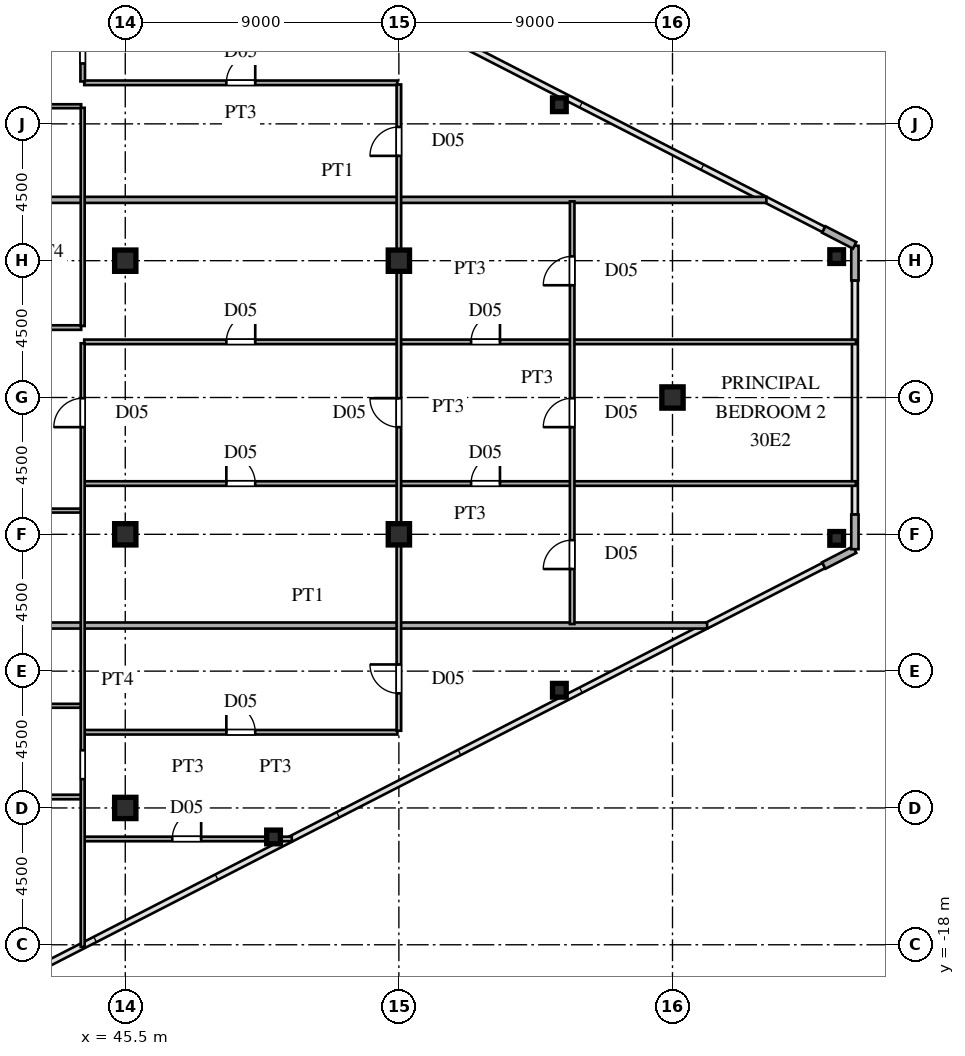
"""IFC4 building model, lengths in metres.
Left out: names, types, materials, properties, quantities, classifications, styles, units other than length and angle.
Written with IfcOpenShell. Run it as: python <this file> out.ifc"""

import sys

from ifc_helpers import new_model, si_unit, direction, frame, frame_2d, origin, origin_2d, place, context, subcontext, project, spatial, rectangle, hollow_rectangle, i_section, extrude, source, transform, mapped, element, fill, save


model = new_model("IFC4")
c1 = context("Model", 3, precision=1e-05, world=origin(), true_north=direction((0.0, 1.0)))
c2 = subcontext(c1, "Body", "Model", "MODEL_VIEW")
j1 = project(units=[si_unit("LENGTHUNIT", "METRE"), si_unit("PLANEANGLEUNIT", "RADIAN")], contexts=[c1])
p1 = place(None, origin())
s1 = spatial("IfcSite", under=j1, at=p1, CompositionType="ELEMENT")
p2 = place(p1, origin())
s2 = spatial("IfcBuilding", under=s1, at=p2, CompositionType="ELEMENT")
p3 = place(p2, frame((0.0, 0.0, 114.0)))
s3 = spatial("IfcBuildingStorey", under=s2, at=p3, CompositionType="ELEMENT", Elevation=114.0)
m1 = source(origin(), c2, "Body", "SweptSolid", [
    extrude(i_section(OverallWidth=0.7, OverallDepth=0.7, WebThickness=0.028, FlangeThickness=0.045, at=origin_2d()), origin(), (0.0, 0.0, 1.0), 3.6),
])
for number, where, z_axis, x_axis in (
    (1, (45.5, -13.5, 0.0), (0.0, 0.0, 1.0), (1.0, 0.0, 0.0)),
    (2, (45.5, -4.5, 0.0), (0.0, 0.0, 1.0), (1.0, 0.0, 0.0)),
    (3, (45.5, 4.5, 0.0), (0.0, 0.0, 1.0), (1.0, 0.0, 0.0)),
    (4, (54.5, -4.5, 0.0), (0.0, 0.0, 1.0), (1.0, 0.0, 0.0)),
    (5, (54.5, 4.5, 0.0), (0.0, 0.0, 1.0), (1.0, 0.0, 0.0)),
    (6, (63.5, 0.0, 0.0), (0.0, 0.0, 1.0), (1.0, 0.0, 0.0)),
):
    element("IfcColumn", number, at=place(p3, frame(where, z_axis=z_axis, x_axis=x_axis)), inside=s3, PredefinedType="COLUMN", context=c2, shape_type="MappedRepresentation", body=[
        mapped(m1, transform((0.0, 0.0, 0.0), scale=1.0)),
    ])
m2 = source(origin(), c2, "Body", "SweptSolid", [
    extrude(hollow_rectangle(XDim=0.45, YDim=0.45, WallThickness=0.018, at=origin_2d()), origin(), (0.0, 0.0, 1.0), 3.6),
])
for number, where, z_axis, x_axis in (
    (7, (68.9, -4.634, 0.0), (0.0, 0.0, 1.0), (1.0, 0.0, 0.0)),
    (8, (68.9, 4.634, 0.0), (0.0, 0.0, 1.0), (1.0, 0.0, 0.0)),
    (9, (50.377, -14.453, 0.0), (0.0, 0.0, 1.0), (1.0, 0.0, 0.0)),
    (10, (59.779, -9.629, 0.0), (0.0, 0.0, 1.0), (1.0, 0.0, 0.0)),
    (11, (59.779, 9.629, 0.0), (0.0, 0.0, 1.0), (1.0, 0.0, 0.0)),
):
    element("IfcColumn", number, at=place(p3, frame(where, z_axis=z_axis, x_axis=x_axis)), inside=s3, PredefinedType="COLUMN", context=c2, shape_type="MappedRepresentation", body=[
        mapped(m2, transform((0.0, 0.0, 0.0), scale=1.0)),
    ])
p4 = place(p3, frame((68.477, -5.525, 0.0), z_axis=(0.0, 0.0, 1.0), x_axis=(0.889797395748, 0.456355776255, 0.0)))
e12 = element("IfcWall", 12, at=p4, inside=s3, PredefinedType="SOLIDWALL", context=c2, shape_type="SweptSolid", body=[
    extrude(rectangle(XDim=1.14, YDim=0.24, at=frame_2d((0.57, 0.0))), origin(), (0.0, 0.0, 1.0), 3.38),
])
for number, where, z_axis, x_axis in (
    (13, (69.5, -4.99, 0.0), (0.0, 0.0, 1.0), (0.0, 1.0, 0.0)),
    (14, (69.5, 3.85, 0.0), (0.0, 0.0, 1.0), (0.0, 1.0, 0.0)),
):
    element("IfcWall", number, at=place(p3, frame(where, z_axis=z_axis, x_axis=x_axis)), inside=s3, PredefinedType="SOLIDWALL", context=c2, shape_type="SweptSolid", body=[
        extrude(rectangle(XDim=1.14, YDim=0.24, at=frame_2d((0.57, 0.0))), origin(), (0.0, 0.0, 1.0), 3.38),
    ])
p5 = place(p3, frame((69.491, 5.005, 0.0), z_axis=(0.0, 0.0, 1.0), x_axis=(-0.889797395748, 0.456355776255, 0.0)))
e15 = element("IfcWall", 15, at=p5, inside=s3, PredefinedType="SOLIDWALL", context=c2, shape_type="SweptSolid", body=[
    extrude(rectangle(XDim=1.14, YDim=0.24, at=frame_2d((0.57, 0.0))), origin(), (0.0, 0.0, 1.0), 3.38),
])
p6 = place(p3, frame((44.15, -14.52, 0.0), z_axis=(0.0, 0.0, 1.0), x_axis=(1.0, 0.0, 0.0)))
e16 = element("IfcWall", 16, at=p6, inside=s3, PredefinedType="PARTITIONING", context=c2, shape_type="SweptSolid", body=[
    extrude(rectangle(XDim=6.828, YDim=0.15, at=frame_2d((3.414, 0.0))), origin(), (0.0, 0.0, 1.0), 2.78),
])
p7 = place(p6, frame((2.896, 0.0, 0.0)))
e17 = element("IfcOpeningElement", 17, at=p7, cuts=e16, PredefinedType="OPENING", context=c2, shape_type="SweptSolid", body=[
    extrude(rectangle(XDim=0.95, YDim=2.15, at=frame_2d((0.475, 1.075))), frame((0.0, 0.085, 0.0), z_axis=(0.0, -1.0, 0.0), x_axis=(1.0, 0.0, 0.0)), (0.0, 0.0, 1.0), 0.17),
])
p8 = place(p3, frame((38.35, -13.14, 0.0), z_axis=(0.0, 0.0, 1.0), x_axis=(1.0, 0.0, 0.0)))
e18 = element("IfcWall", 18, at=p8, inside=s3, PredefinedType="PARTITIONING", context=c2, shape_type="SweptSolid", body=[
    extrude(rectangle(XDim=5.7, YDim=0.15, at=frame_2d((2.85, 0.0))), origin(), (0.0, 0.0, 1.0), 3.38),
])
p9 = place(p8, frame((2.375, 0.0, 0.0)))
e19 = element("IfcOpeningElement", 19, at=p9, cuts=e18, PredefinedType="OPENING", context=c2, shape_type="SweptSolid", body=[
    extrude(rectangle(XDim=0.95, YDim=2.15, at=frame_2d((0.475, 1.075))), frame((0.0, 0.085, 0.0), z_axis=(0.0, -1.0, 0.0), x_axis=(1.0, 0.0, 0.0)), (0.0, 0.0, 1.0), 0.17),
])
p10 = place(p3, frame((44.15, -11.01, 0.0), z_axis=(0.0, 0.0, 1.0), x_axis=(1.0, 0.0, 0.0)))
e20 = element("IfcWall", 20, at=p10, inside=s3, PredefinedType="PARTITIONING", context=c2, shape_type="SweptSolid", body=[
    extrude(rectangle(XDim=10.3, YDim=0.15, at=frame_2d((5.15, 0.0))), origin(), (0.0, 0.0, 1.0), 3.38),
])
p11 = place(p10, frame((4.675, 0.0, 0.0)))
e21 = element("IfcOpeningElement", 21, at=p11, cuts=e20, PredefinedType="OPENING", context=c2, shape_type="SweptSolid", body=[
    extrude(rectangle(XDim=0.95, YDim=2.15, at=frame_2d((0.475, 1.075))), frame((0.0, 0.085, 0.0), z_axis=(0.0, -1.0, 0.0), x_axis=(1.0, 0.0, 0.0)), (0.0, 0.0, 1.0), 0.17),
])
p12 = place(p3, frame((38.35, -10.14, 0.0), z_axis=(0.0, 0.0, 1.0), x_axis=(1.0, 0.0, 0.0)))
e22 = element("IfcWall", 22, at=p12, inside=s3, PredefinedType="PARTITIONING", context=c2, shape_type="SweptSolid", body=[
    extrude(rectangle(XDim=5.7, YDim=0.13, at=frame_2d((2.85, 0.0))), origin(), (0.0, 0.0, 1.0), 3.38),
])
p13 = place(p12, frame((2.41, 0.0, 0.0)))
e23 = element("IfcOpeningElement", 23, at=p13, cuts=e22, PredefinedType="OPENING", context=c2, shape_type="SweptSolid", body=[
    extrude(rectangle(XDim=0.88, YDim=2.1, at=frame_2d((0.44, 1.05))), frame((0.0, 0.075, 0.0), z_axis=(0.0, -1.0, 0.0), x_axis=(1.0, 0.0, 0.0)), (0.0, 0.0, 1.0), 0.15),
])
p14 = place(p3, frame((38.38, -7.5, 0.0), z_axis=(0.0, 0.0, 1.0), x_axis=(1.0, 0.0, 0.0)))
e24 = element("IfcWall", 24, at=p14, inside=s3, PredefinedType="PARTITIONING", context=c2, shape_type="SweptSolid", body=[
    extrude(rectangle(XDim=26.259, YDim=0.2, at=frame_2d((13.129, 0.0))), origin(), (0.0, 0.0, 1.0), 3.38),
])
p15 = place(p3, frame((38.35, -3.72, 0.0), z_axis=(0.0, 0.0, 1.0), x_axis=(1.0, 0.0, 0.0)))
e25 = element("IfcWall", 25, at=p15, inside=s3, PredefinedType="PARTITIONING", context=c2, shape_type="SweptSolid", body=[
    extrude(rectangle(XDim=5.7, YDim=0.13, at=frame_2d((2.85, 0.0))), origin(), (0.0, 0.0, 1.0), 3.38),
])
p16 = place(p15, frame((2.41, 0.0, 0.0)))
e26 = element("IfcOpeningElement", 26, at=p16, cuts=e25, PredefinedType="OPENING", context=c2, shape_type="SweptSolid", body=[
    extrude(rectangle(XDim=0.88, YDim=2.1, at=frame_2d((0.44, 1.05))), frame((0.0, 0.075, 0.0), z_axis=(0.0, -1.0, 0.0), x_axis=(1.0, 0.0, 0.0)), (0.0, 0.0, 1.0), 0.15),
])
p17 = place(p3, frame((44.15, -2.83, 0.0), z_axis=(0.0, 0.0, 1.0), x_axis=(1.0, 0.0, 0.0)))
e27 = element("IfcWall", 27, at=p17, inside=s3, PredefinedType="PARTITIONING", context=c2, shape_type="SweptSolid", body=[
    extrude(rectangle(XDim=25.385, YDim=0.15, at=frame_2d((12.692, 0.0))), origin(), (0.0, 0.0, 1.0), 3.38),
])
p18 = place(p17, frame((4.675, 0.0, 0.0)))
e28 = element("IfcOpeningElement", 28, at=p18, cuts=e27, PredefinedType="OPENING", context=c2, shape_type="SweptSolid", body=[
    extrude(rectangle(XDim=0.95, YDim=2.15, at=frame_2d((0.475, 1.075))), frame((0.0, 0.085, 0.0), z_axis=(0.0, -1.0, 0.0), x_axis=(1.0, 0.0, 0.0)), (0.0, 0.0, 1.0), 0.17),
])
p19 = place(p17, frame((12.725, 0.0, 0.0)))
e29 = element("IfcOpeningElement", 29, at=p19, cuts=e27, PredefinedType="OPENING", context=c2, shape_type="SweptSolid", body=[
    extrude(rectangle(XDim=0.95, YDim=2.15, at=frame_2d((0.475, 1.075))), frame((0.0, 0.085, 0.0), z_axis=(0.0, -1.0, 0.0), x_axis=(1.0, 0.0, 0.0)), (0.0, 0.0, 1.0), 0.17),
])
p20 = place(p3, frame((44.15, 1.83, 0.0), z_axis=(0.0, 0.0, 1.0), x_axis=(1.0, 0.0, 0.0)))
e30 = element("IfcWall", 30, at=p20, inside=s3, PredefinedType="PARTITIONING", context=c2, shape_type="SweptSolid", body=[
    extrude(rectangle(XDim=25.385, YDim=0.15, at=frame_2d((12.692, 0.0))), origin(), (0.0, 0.0, 1.0), 3.38),
])
p21 = place(p20, frame((4.675, 0.0, 0.0)))
e31 = element("IfcOpeningElement", 31, at=p21, cuts=e30, PredefinedType="OPENING", context=c2, shape_type="SweptSolid", body=[
    extrude(rectangle(XDim=0.95, YDim=2.15, at=frame_2d((0.475, 1.075))), frame((0.0, 0.085, 0.0), z_axis=(0.0, -1.0, 0.0), x_axis=(1.0, 0.0, 0.0)), (0.0, 0.0, 1.0), 0.17),
])
p22 = place(p20, frame((12.725, 0.0, 0.0)))
e32 = element("IfcOpeningElement", 32, at=p22, cuts=e30, PredefinedType="OPENING", context=c2, shape_type="SweptSolid", body=[
    extrude(rectangle(XDim=0.95, YDim=2.15, at=frame_2d((0.475, 1.075))), frame((0.0, 0.085, 0.0), z_axis=(0.0, -1.0, 0.0), x_axis=(1.0, 0.0, 0.0)), (0.0, 0.0, 1.0), 0.17),
])
p23 = place(p3, frame((38.35, 2.3, 0.0), z_axis=(0.0, 0.0, 1.0), x_axis=(1.0, 0.0, 0.0)))
e33 = element("IfcWall", 33, at=p23, inside=s3, PredefinedType="PARTITIONING", context=c2, shape_type="SweptSolid", body=[
    extrude(rectangle(XDim=5.7, YDim=0.15, at=frame_2d((2.85, 0.0))), origin(), (0.0, 0.0, 1.0), 3.38),
])
p24 = place(p23, frame((2.375, 0.0, 0.0)))
e34 = element("IfcOpeningElement", 34, at=p24, cuts=e33, PredefinedType="OPENING", context=c2, shape_type="SweptSolid", body=[
    extrude(rectangle(XDim=0.95, YDim=2.15, at=frame_2d((0.475, 1.075))), frame((0.0, 0.085, 0.0), z_axis=(0.0, -1.0, 0.0), x_axis=(1.0, 0.0, 0.0)), (0.0, 0.0, 1.0), 0.17),
])
p25 = place(p3, frame((38.38, 6.5, 0.0), z_axis=(0.0, 0.0, 1.0), x_axis=(1.0, 0.0, 0.0)))
e35 = element("IfcWall", 35, at=p25, inside=s3, PredefinedType="PARTITIONING", context=c2, shape_type="SweptSolid", body=[
    extrude(rectangle(XDim=28.208, YDim=0.2, at=frame_2d((14.104, 0.0))), origin(), (0.0, 0.0, 1.0), 3.38),
])
p26 = place(p3, frame((38.35, 9.58, 0.0), z_axis=(0.0, 0.0, 1.0), x_axis=(1.0, 0.0, 0.0)))
e36 = element("IfcWall", 36, at=p26, inside=s3, PredefinedType="PARTITIONING", context=c2, shape_type="SweptSolid", body=[
    extrude(rectangle(XDim=5.7, YDim=0.13, at=frame_2d((2.85, 0.0))), origin(), (0.0, 0.0, 1.0), 3.38),
])
p27 = place(p26, frame((2.41, 0.0, 0.0)))
e37 = element("IfcOpeningElement", 37, at=p27, cuts=e36, PredefinedType="OPENING", context=c2, shape_type="SweptSolid", body=[
    extrude(rectangle(XDim=0.88, YDim=2.1, at=frame_2d((0.44, 1.05))), frame((0.0, 0.075, 0.0), z_axis=(0.0, -1.0, 0.0), x_axis=(1.0, 0.0, 0.0)), (0.0, 0.0, 1.0), 0.15),
])
p28 = place(p3, frame((44.15, 10.35, 0.0), z_axis=(0.0, 0.0, 1.0), x_axis=(1.0, 0.0, 0.0)))
e38 = element("IfcWall", 38, at=p28, inside=s3, PredefinedType="PARTITIONING", context=c2, shape_type="SweptSolid", body=[
    extrude(rectangle(XDim=10.3, YDim=0.15, at=frame_2d((5.15, 0.0))), origin(), (0.0, 0.0, 1.0), 3.38),
])
p29 = place(p28, frame((4.675, 0.0, 0.0)))
e39 = element("IfcOpeningElement", 39, at=p29, cuts=e38, PredefinedType="OPENING", context=c2, shape_type="SweptSolid", body=[
    extrude(rectangle(XDim=0.95, YDim=2.15, at=frame_2d((0.475, 1.075))), frame((0.0, 0.085, 0.0), z_axis=(0.0, -1.0, 0.0), x_axis=(1.0, 0.0, 0.0)), (0.0, 0.0, 1.0), 0.17),
])
p30 = place(p3, frame((44.1, -18.069, 0.0), z_axis=(0.0, 0.0, 1.0), x_axis=(0.0, 1.0, 0.0)))
e40 = element("IfcWall", 40, at=p30, inside=s3, PredefinedType="PARTITIONING", context=c2, shape_type="SweptSolid", body=[
    extrude(rectangle(XDim=19.852, YDim=0.13, at=frame_2d((9.926, 0.0))), origin(), (0.0, 0.0, 1.0), 3.38),
])
p31 = place(p30, frame((5.516, 0.0, 0.0)))
e41 = element("IfcOpeningElement", 41, at=p31, cuts=e40, PredefinedType="OPENING", context=c2, shape_type="SweptSolid", body=[
    extrude(rectangle(XDim=0.95, YDim=2.15, at=frame_2d((0.475, 1.075))), frame((0.0, 0.075, 0.0), z_axis=(0.0, -1.0, 0.0), x_axis=(1.0, 0.0, 0.0)), (0.0, 0.0, 1.0), 0.15),
])
p32 = place(p30, frame((17.094, 0.0, 0.0)))
e42 = element("IfcOpeningElement", 42, at=p32, cuts=e40, PredefinedType="OPENING", context=c2, shape_type="SweptSolid", body=[
    extrude(rectangle(XDim=0.95, YDim=2.15, at=frame_2d((0.475, 1.075))), frame((0.0, 0.075, 0.0), z_axis=(0.0, -1.0, 0.0), x_axis=(1.0, 0.0, 0.0)), (0.0, 0.0, 1.0), 0.15),
])
p33 = place(p3, frame((44.1, 2.352, 0.0), z_axis=(0.0, 0.0, 1.0), x_axis=(0.0, 1.0, 0.0)))
e43 = element("IfcWall", 43, at=p33, inside=s3, PredefinedType="PARTITIONING", context=c2, shape_type="SweptSolid", body=[
    extrude(rectangle(XDim=7.176, YDim=0.13, at=frame_2d((3.588, 0.0))), origin(), (0.0, 0.0, 1.0), 3.38),
])
p34 = place(p3, frame((44.1, 10.395, 0.0), z_axis=(0.0, 0.0, 1.0), x_axis=(0.0, 1.0, 0.0)))
e44 = element("IfcWall", 44, at=p34, inside=s3, PredefinedType="PARTITIONING", context=c2, shape_type="SweptSolid", body=[
    extrude(rectangle(XDim=7.674, YDim=0.15, at=frame_2d((3.837, 0.0))), origin(), (0.0, 0.0, 1.0), 3.38),
])
p35 = place(p34, frame((0.591, 0.0, 0.0)))
e45 = element("IfcOpeningElement", 45, at=p35, cuts=e44, PredefinedType="OPENING", context=c2, shape_type="SweptSolid", body=[
    extrude(rectangle(XDim=0.95, YDim=2.15, at=frame_2d((0.475, 1.075))), frame((0.0, 0.085, 0.0), z_axis=(0.0, -1.0, 0.0), x_axis=(1.0, 0.0, 0.0)), (0.0, 0.0, 1.0), 0.17),
])
p36 = place(p3, frame((54.5, -10.961, 0.0), z_axis=(0.0, 0.0, 1.0), x_axis=(0.0, 1.0, 0.0)))
e46 = element("IfcWall", 46, at=p36, inside=s3, PredefinedType="PARTITIONING", context=c2, shape_type="SweptSolid", body=[
    extrude(rectangle(XDim=21.256, YDim=0.15, at=frame_2d((10.628, 0.0))), origin(), (0.0, 0.0, 1.0), 2.78),
])
p37 = place(p36, frame((1.23, 0.0, 0.0)))
e47 = element("IfcOpeningElement", 47, at=p37, cuts=e46, PredefinedType="OPENING", context=c2, shape_type="SweptSolid", body=[
    extrude(rectangle(XDim=0.95, YDim=2.15, at=frame_2d((0.475, 1.075))), frame((0.0, 0.085, 0.0), z_axis=(0.0, -1.0, 0.0), x_axis=(1.0, 0.0, 0.0)), (0.0, 0.0, 1.0), 0.17),
])
p38 = place(p36, frame((9.986, 0.0, 0.0)))
e48 = element("IfcOpeningElement", 48, at=p38, cuts=e46, PredefinedType="OPENING", context=c2, shape_type="SweptSolid", body=[
    extrude(rectangle(XDim=0.95, YDim=2.15, at=frame_2d((0.475, 1.075))), frame((0.0, 0.085, 0.0), z_axis=(0.0, -1.0, 0.0), x_axis=(1.0, 0.0, 0.0)), (0.0, 0.0, 1.0), 0.17),
])
p39 = place(p36, frame((18.908, 0.0, 0.0)))
e49 = element("IfcOpeningElement", 49, at=p39, cuts=e46, PredefinedType="OPENING", context=c2, shape_type="SweptSolid", body=[
    extrude(rectangle(XDim=0.95, YDim=2.15, at=frame_2d((0.475, 1.075))), frame((0.0, 0.085, 0.0), z_axis=(0.0, -1.0, 0.0), x_axis=(1.0, 0.0, 0.0)), (0.0, 0.0, 1.0), 0.17),
])
p40 = place(p3, frame((60.2, -7.45, 0.0), z_axis=(0.0, 0.0, 1.0), x_axis=(0.0, 1.0, 0.0)))
e50 = element("IfcWall", 50, at=p40, inside=s3, PredefinedType="PARTITIONING", context=c2, shape_type="SweptSolid", body=[
    extrude(rectangle(XDim=13.9, YDim=0.15, at=frame_2d((6.95, 0.0))), origin(), (0.0, 0.0, 1.0), 3.38),
])
p41 = place(p40, frame((1.808, 0.0, 0.0)))
e51 = element("IfcOpeningElement", 51, at=p41, cuts=e50, PredefinedType="OPENING", context=c2, shape_type="SweptSolid", body=[
    extrude(rectangle(XDim=0.95, YDim=2.15, at=frame_2d((0.475, 1.075))), frame((0.0, 0.085, 0.0), z_axis=(0.0, -1.0, 0.0), x_axis=(1.0, 0.0, 0.0)), (0.0, 0.0, 1.0), 0.17),
])
p42 = place(p40, frame((6.475, 0.0, 0.0)))
e52 = element("IfcOpeningElement", 52, at=p42, cuts=e50, PredefinedType="OPENING", context=c2, shape_type="SweptSolid", body=[
    extrude(rectangle(XDim=0.95, YDim=2.15, at=frame_2d((0.475, 1.075))), frame((0.0, 0.085, 0.0), z_axis=(0.0, -1.0, 0.0), x_axis=(1.0, 0.0, 0.0)), (0.0, 0.0, 1.0), 0.17),
])
p43 = place(p40, frame((11.142, 0.0, 0.0)))
e53 = element("IfcOpeningElement", 53, at=p43, cuts=e50, PredefinedType="OPENING", context=c2, shape_type="SweptSolid", body=[
    extrude(rectangle(XDim=0.95, YDim=2.15, at=frame_2d((0.475, 1.075))), frame((0.0, 0.085, 0.0), z_axis=(0.0, -1.0, 0.0), x_axis=(1.0, 0.0, 0.0)), (0.0, 0.0, 1.0), 0.17),
])
m3 = source(origin(), c2, "Body", "SweptSolid", [
    extrude(rectangle(XDim=0.95, YDim=2.15, at=frame_2d((0.475, 1.075))), frame((0.0, 0.025, 0.0), z_axis=(0.0, -1.0, 0.0), x_axis=(1.0, 0.0, 0.0)), (0.0, 0.0, 1.0), 0.05),
])
p44 = place(p7, origin())
e54 = element("IfcDoor", 54, at=p44, inside=s3, OperationType="SINGLE_SWING_RIGHT", PredefinedType="DOOR", context=c2, shape_type="MappedRepresentation", body=[
    mapped(m3, transform((0.0, 0.0, 0.0), scale=1.0)),
])
fill(e17, e54)
p45 = place(p11, origin())
e55 = element("IfcDoor", 55, at=p45, inside=s3, OperationType="SINGLE_SWING_LEFT", PredefinedType="DOOR", context=c2, shape_type="MappedRepresentation", body=[
    mapped(m3, transform((0.0, 0.0, 0.0), scale=1.0)),
])
fill(e21, e55)
p46 = place(p18, origin())
e56 = element("IfcDoor", 56, at=p46, inside=s3, OperationType="SINGLE_SWING_LEFT", PredefinedType="DOOR", context=c2, shape_type="MappedRepresentation", body=[
    mapped(m3, transform((0.0, 0.0, 0.0), scale=1.0)),
])
fill(e28, e56)
p47 = place(p19, origin())
e57 = element("IfcDoor", 57, at=p47, inside=s3, OperationType="SINGLE_SWING_RIGHT", PredefinedType="DOOR", context=c2, shape_type="MappedRepresentation", body=[
    mapped(m3, transform((0.0, 0.0, 0.0), scale=1.0)),
])
fill(e29, e57)
p48 = place(p21, origin())
e58 = element("IfcDoor", 58, at=p48, inside=s3, OperationType="SINGLE_SWING_RIGHT", PredefinedType="DOOR", context=c2, shape_type="MappedRepresentation", body=[
    mapped(m3, transform((0.0, 0.0, 0.0), scale=1.0)),
])
fill(e31, e58)
p49 = place(p22, origin())
e59 = element("IfcDoor", 59, at=p49, inside=s3, OperationType="SINGLE_SWING_RIGHT", PredefinedType="DOOR", context=c2, shape_type="MappedRepresentation", body=[
    mapped(m3, transform((0.0, 0.0, 0.0), scale=1.0)),
])
fill(e32, e59)
p50 = place(p29, origin())
e60 = element("IfcDoor", 60, at=p50, inside=s3, OperationType="SINGLE_SWING_RIGHT", PredefinedType="DOOR", context=c2, shape_type="MappedRepresentation", body=[
    mapped(m3, transform((0.0, 0.0, 0.0), scale=1.0)),
])
fill(e39, e60)
p51 = place(p32, origin())
e61 = element("IfcDoor", 61, at=p51, inside=s3, OperationType="SINGLE_SWING_LEFT", PredefinedType="DOOR", context=c2, shape_type="MappedRepresentation", body=[
    mapped(m3, transform((0.0, 0.0, 0.0), scale=1.0)),
])
fill(e42, e61)
p52 = place(p37, origin())
e62 = element("IfcDoor", 62, at=p52, inside=s3, OperationType="SINGLE_SWING_RIGHT", PredefinedType="DOOR", context=c2, shape_type="MappedRepresentation", body=[
    mapped(m3, transform((0.0, 0.0, 0.0), scale=1.0)),
])
fill(e47, e62)
p53 = place(p38, origin())
e63 = element("IfcDoor", 63, at=p53, inside=s3, OperationType="SINGLE_SWING_RIGHT", PredefinedType="DOOR", context=c2, shape_type="MappedRepresentation", body=[
    mapped(m3, transform((0.0, 0.0, 0.0), scale=1.0)),
])
fill(e48, e63)
p54 = place(p39, origin())
e64 = element("IfcDoor", 64, at=p54, inside=s3, OperationType="SINGLE_SWING_LEFT", PredefinedType="DOOR", context=c2, shape_type="MappedRepresentation", body=[
    mapped(m3, transform((0.0, 0.0, 0.0), scale=1.0)),
])
fill(e49, e64)
p55 = place(p41, origin())
e65 = element("IfcDoor", 65, at=p55, inside=s3, OperationType="SINGLE_SWING_LEFT", PredefinedType="DOOR", context=c2, shape_type="MappedRepresentation", body=[
    mapped(m3, transform((0.0, 0.0, 0.0), scale=1.0)),
])
fill(e51, e65)
p56 = place(p42, origin())
e66 = element("IfcDoor", 66, at=p56, inside=s3, OperationType="SINGLE_SWING_LEFT", PredefinedType="DOOR", context=c2, shape_type="MappedRepresentation", body=[
    mapped(m3, transform((0.0, 0.0, 0.0), scale=1.0)),
])
fill(e52, e66)
p57 = place(p43, origin())
e67 = element("IfcDoor", 67, at=p57, inside=s3, OperationType="SINGLE_SWING_LEFT", PredefinedType="DOOR", context=c2, shape_type="MappedRepresentation", body=[
    mapped(m3, transform((0.0, 0.0, 0.0), scale=1.0)),
])
fill(e53, e67)
save(model, sys.argv[1])
